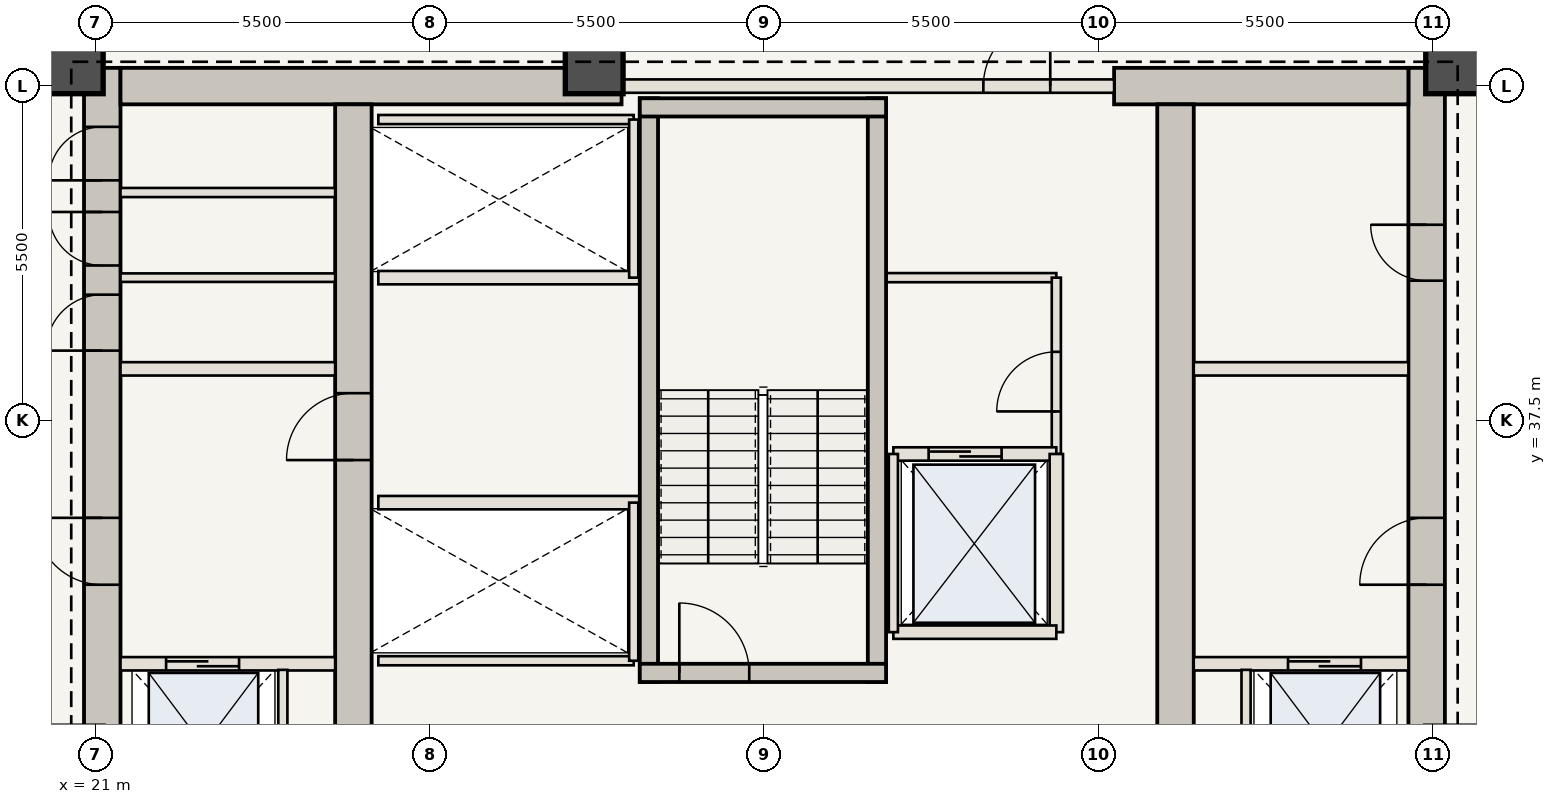
"""IFC4 building model, lengths in metres.
Left out: names, types, materials, properties, quantities, classifications, styles, units other than length and angle.
Written with IfcOpenShell. Run it as: python <this file> out.ifc"""

import sys

from ifc_helpers import new_model, si_unit, direction, frame, frame_2d, origin, origin_2d, place, context, subcontext, project, spatial, rectangle, extrude, element, fill, save


model = new_model("IFC4")
c1 = context("Model", 3, precision=1e-05, world=origin(), true_north=direction((0.0, 1.0)))
c2 = subcontext(c1, "Body", "Model", "MODEL_VIEW")
j1 = project(units=[si_unit("LENGTHUNIT", "METRE"), si_unit("PLANEANGLEUNIT", "RADIAN")], contexts=[c1])
p1 = place(None, origin())
s1 = spatial("IfcSite", under=j1, at=p1, CompositionType="ELEMENT")
p2 = place(p1, origin())
s2 = spatial("IfcBuilding", under=s1, at=p2, CompositionType="ELEMENT")
p3 = place(p2, frame((0.0, 0.0, 141.4)))
s3 = spatial("IfcBuildingStorey", under=s2, at=p3, CompositionType="ELEMENT", Elevation=141.4)
p4 = place(p3, frame((21.11, 30.6, 0.0), z_axis=(0.0, 0.0, 1.0), x_axis=(0.0, 1.0, 0.0)))
e1 = element("IfcWall", 1, at=p4, inside=s3, PredefinedType="SHEAR", context=c2, shape_type="SweptSolid", body=[
    extrude(rectangle(XDim=12.7, YDim=0.6, at=frame_2d((6.35, 0.0))), origin(), (0.0, 0.0, 1.0), 3.85),
])
p5 = place(p4, frame((4.2, 0.0, 0.0)))
e2 = element("IfcOpeningElement", 2, at=p5, cuts=e1, PredefinedType="OPENING", context=c2, shape_type="SweptSolid", body=[
    extrude(rectangle(XDim=1.1, YDim=2.15, at=frame_2d((0.55, 1.075))), frame((0.0, 0.31, 0.0), z_axis=(0.0, -1.0, 0.0), x_axis=(1.0, 0.0, 0.0)), (0.0, 0.0, 1.0), 0.62),
])
p6 = place(p4, frame((8.05, 0.0, 0.0)))
e3 = element("IfcOpeningElement", 3, at=p6, cuts=e1, PredefinedType="OPENING", context=c2, shape_type="SweptSolid", body=[
    extrude(rectangle(XDim=0.92, YDim=2.1, at=frame_2d((0.46, 1.05))), frame((0.0, 0.31, 0.0), z_axis=(0.0, -1.0, 0.0), x_axis=(1.0, 0.0, 0.0)), (0.0, 0.0, 1.0), 0.62),
])
p7 = place(p4, frame((9.45, 0.0, 0.0)))
e4 = element("IfcOpeningElement", 4, at=p7, cuts=e1, PredefinedType="OPENING", context=c2, shape_type="SweptSolid", body=[
    extrude(rectangle(XDim=0.88, YDim=2.1, at=frame_2d((0.44, 1.05))), frame((0.0, 0.31, 0.0), z_axis=(0.0, -1.0, 0.0), x_axis=(1.0, 0.0, 0.0)), (0.0, 0.0, 1.0), 0.62),
])
p8 = place(p4, frame((10.85, 0.0, 0.0)))
e5 = element("IfcOpeningElement", 5, at=p8, cuts=e1, PredefinedType="OPENING", context=c2, shape_type="SweptSolid", body=[
    extrude(rectangle(XDim=0.88, YDim=2.1, at=frame_2d((0.44, 1.05))), frame((0.0, 0.31, 0.0), z_axis=(0.0, -1.0, 0.0), x_axis=(1.0, 0.0, 0.0)), (0.0, 0.0, 1.0), 0.62),
])
p9 = place(p3, frame((42.89, 30.6, 0.0), z_axis=(0.0, 0.0, 1.0), x_axis=(0.0, 1.0, 0.0)))
e6 = element("IfcWall", 6, at=p9, inside=s3, PredefinedType="SHEAR", context=c2, shape_type="SweptSolid", body=[
    extrude(rectangle(XDim=12.7, YDim=0.6, at=frame_2d((6.35, 0.0))), origin(), (0.0, 0.0, 1.0), 3.85),
])
p10 = place(p9, frame((4.2, 0.0, 0.0)))
e7 = element("IfcOpeningElement", 7, at=p10, cuts=e6, PredefinedType="OPENING", context=c2, shape_type="SweptSolid", body=[
    extrude(rectangle(XDim=1.1, YDim=2.15, at=frame_2d((0.55, 1.075))), frame((0.0, 0.31, 0.0), z_axis=(0.0, -1.0, 0.0), x_axis=(1.0, 0.0, 0.0)), (0.0, 0.0, 1.0), 0.62),
])
p11 = place(p9, frame((9.2, 0.0, 0.0)))
e8 = element("IfcOpeningElement", 8, at=p11, cuts=e6, PredefinedType="OPENING", context=c2, shape_type="SweptSolid", body=[
    extrude(rectangle(XDim=0.92, YDim=2.1, at=frame_2d((0.46, 1.05))), frame((0.0, 0.31, 0.0), z_axis=(0.0, -1.0, 0.0), x_axis=(1.0, 0.0, 0.0)), (0.0, 0.0, 1.0), 0.62),
])
p12 = place(p3, frame((21.41, 43.0, 0.0), z_axis=(0.0, 0.0, 1.0), x_axis=(1.0, 0.0, 0.0)))
e9 = element("IfcWall", 9, at=p12, inside=s3, PredefinedType="SHEAR", context=c2, shape_type="SweptSolid", body=[
    extrude(rectangle(XDim=8.24, YDim=0.6, at=frame_2d((4.12, 0.0))), origin(), (0.0, 0.0, 1.0), 3.85),
])
p13 = place(p3, frame((37.75, 43.0, 0.0), z_axis=(0.0, 0.0, 1.0), x_axis=(1.0, 0.0, 0.0)))
e10 = element("IfcWall", 10, at=p13, inside=s3, PredefinedType="SHEAR", context=c2, shape_type="SweptSolid", body=[
    extrude(rectangle(XDim=4.84, YDim=0.6, at=frame_2d((2.42, 0.0))), origin(), (0.0, 0.0, 1.0), 3.85),
])
p14 = place(p3, frame((25.24, 30.6, 0.0), z_axis=(0.0, 0.0, 1.0), x_axis=(0.0, 1.0, 0.0)))
e11 = element("IfcWall", 11, at=p14, inside=s3, PredefinedType="SHEAR", context=c2, shape_type="SweptSolid", body=[
    extrude(rectangle(XDim=12.1, YDim=0.6, at=frame_2d((6.05, 0.0))), origin(), (0.0, 0.0, 1.0), 3.85),
])
p15 = place(p14, frame((6.25, 0.0, 0.0)))
e12 = element("IfcOpeningElement", 12, at=p15, cuts=e11, PredefinedType="OPENING", context=c2, shape_type="SweptSolid", body=[
    extrude(rectangle(XDim=1.1, YDim=2.15, at=frame_2d((0.55, 1.075))), frame((0.0, 0.31, 0.0), z_axis=(0.0, -1.0, 0.0), x_axis=(1.0, 0.0, 0.0)), (0.0, 0.0, 1.0), 0.62),
])
p16 = place(p3, frame((38.76, 30.6, 0.0), z_axis=(0.0, 0.0, 1.0), x_axis=(0.0, 1.0, 0.0)))
e13 = element("IfcWall", 13, at=p16, inside=s3, PredefinedType="SHEAR", context=c2, shape_type="SweptSolid", body=[
    extrude(rectangle(XDim=12.1, YDim=0.6, at=frame_2d((6.05, 0.0))), origin(), (0.0, 0.0, 1.0), 3.85),
])
for number, where, z_axis, x_axis in (
    (14, (43.35, 43.35, 0.0), (0.0, 0.0, 1.0), (1.0, 0.0, 0.0)),
    (15, (29.2, 43.35, 0.0), (0.0, 0.0, 1.0), (1.0, 0.0, 0.0)),
    (16, (20.65, 43.35, 0.0), (0.0, 0.0, 1.0), (1.0, 0.0, 0.0)),
):
    element("IfcColumn", number, at=place(p3, frame(where, z_axis=z_axis, x_axis=x_axis)), inside=s3, PredefinedType="COLUMN", context=c2, shape_type="SweptSolid", body=[
        extrude(rectangle(XDim=0.95, YDim=0.95, at=origin_2d()), origin(), (0.0, 0.0, 1.0), 3.85),
    ])
p17 = place(p3, frame((21.41, 33.5, 0.0), z_axis=(0.0, 0.0, 1.0), x_axis=(1.0, 0.0, 0.0)))
e17 = element("IfcWall", 17, at=p17, inside=s3, PredefinedType="STANDARD", context=c2, shape_type="SweptSolid", body=[
    extrude(rectangle(XDim=3.53, YDim=0.22, at=frame_2d((1.765, 0.0))), origin(), (0.0, 0.0, 1.0), 3.685),
])
p18 = place(p17, frame((0.75, 0.0, 0.0)))
e18 = element("IfcOpeningElement", 18, at=p18, cuts=e17, PredefinedType="OPENING", context=c2, shape_type="SweptSolid", body=[
    extrude(rectangle(XDim=1.2, YDim=2.2, at=frame_2d((0.6, 1.1))), frame((0.0, 0.12, 0.0), z_axis=(0.0, -1.0, 0.0), x_axis=(1.0, 0.0, 0.0)), (0.0, 0.0, 1.0), 0.24),
])
p19 = place(p3, frame((24.08, 30.75, 0.0), z_axis=(0.0, 0.0, 1.0), x_axis=(0.0, 1.0, 0.0)))
e19 = element("IfcWall", 19, at=p19, inside=s3, PredefinedType="STANDARD", context=c2, shape_type="SweptSolid", body=[
    extrude(rectangle(XDim=2.65, YDim=0.15, at=frame_2d((1.325, 0.0))), origin(), (0.0, 0.0, 1.0), 3.685),
])
p20 = place(p3, frame((39.06, 33.5, 0.0), z_axis=(0.0, 0.0, 1.0), x_axis=(1.0, 0.0, 0.0)))
e20 = element("IfcWall", 20, at=p20, inside=s3, PredefinedType="STANDARD", context=c2, shape_type="SweptSolid", body=[
    extrude(rectangle(XDim=3.53, YDim=0.22, at=frame_2d((1.765, 0.0))), origin(), (0.0, 0.0, 1.0), 3.685),
])
p21 = place(p20, frame((1.55, 0.0, 0.0)))
e21 = element("IfcOpeningElement", 21, at=p21, cuts=e20, PredefinedType="OPENING", context=c2, shape_type="SweptSolid", body=[
    extrude(rectangle(XDim=1.2, YDim=2.2, at=frame_2d((0.6, 1.1))), frame((0.0, 0.12, 0.0), z_axis=(0.0, -1.0, 0.0), x_axis=(1.0, 0.0, 0.0)), (0.0, 0.0, 1.0), 0.24),
])
p22 = place(p3, frame((39.92, 30.75, 0.0), z_axis=(0.0, 0.0, 1.0), x_axis=(0.0, 1.0, 0.0)))
e22 = element("IfcWall", 22, at=p22, inside=s3, PredefinedType="STANDARD", context=c2, shape_type="SweptSolid", body=[
    extrude(rectangle(XDim=2.65, YDim=0.15, at=frame_2d((1.325, 0.0))), origin(), (0.0, 0.0, 1.0), 3.685),
])
for number, where, z_axis, x_axis in (
    (23, (21.41, 38.35, 0.0), (0.0, 0.0, 1.0), (1.0, 0.0, 0.0)),
    (24, (39.06, 38.35, 0.0), (0.0, 0.0, 1.0), (1.0, 0.0, 0.0)),
):
    element("IfcWall", number, at=place(p3, frame(where, z_axis=z_axis, x_axis=x_axis)), inside=s3, PredefinedType="STANDARD", context=c2, shape_type="SweptSolid", body=[
        extrude(rectangle(XDim=3.53, YDim=0.22, at=frame_2d((1.765, 0.0))), origin(), (0.0, 0.0, 1.0), 3.685),
    ])
p23 = place(p3, frame((21.41, 39.85, 0.0), z_axis=(0.0, 0.0, 1.0), x_axis=(1.0, 0.0, 0.0)))
e25 = element("IfcWall", 25, at=p23, inside=s3, PredefinedType="STANDARD", context=c2, shape_type="SweptSolid", body=[
    extrude(rectangle(XDim=3.53, YDim=0.14, at=frame_2d((1.765, 0.0))), origin(), (0.0, 0.0, 1.0), 3.685),
])
p24 = place(p3, frame((21.41, 41.25, 0.0), z_axis=(0.0, 0.0, 1.0), x_axis=(1.0, 0.0, 0.0)))
e26 = element("IfcWall", 26, at=p24, inside=s3, PredefinedType="STANDARD", context=c2, shape_type="SweptSolid", body=[
    extrude(rectangle(XDim=3.53, YDim=0.15, at=frame_2d((1.765, 0.0))), origin(), (0.0, 0.0, 1.0), 3.685),
])
p25 = place(p3, frame((34.0, 39.85, 0.0), z_axis=(0.0, 0.0, 1.0), x_axis=(1.0, 0.0, 0.0)))
e27 = element("IfcWall", 27, at=p25, inside=s3, PredefinedType="STANDARD", context=c2, shape_type="SweptSolid", body=[
    extrude(rectangle(XDim=2.8, YDim=0.15, at=frame_2d((1.4, 0.0))), origin(), (0.0, 0.0, 1.0), 3.685),
])
p26 = place(p3, frame((36.8, 36.95, 0.0), z_axis=(0.0, 0.0, 1.0), x_axis=(0.0, 1.0, 0.0)))
e28 = element("IfcWall", 28, at=p26, inside=s3, PredefinedType="STANDARD", context=c2, shape_type="SweptSolid", body=[
    extrude(rectangle(XDim=2.9, YDim=0.15, at=frame_2d((1.45, 0.0))), origin(), (0.0, 0.0, 1.0), 3.685),
])
p27 = place(p26, frame((0.7, 0.0, 0.0)))
e29 = element("IfcOpeningElement", 29, at=p27, cuts=e28, PredefinedType="OPENING", context=c2, shape_type="SweptSolid", body=[
    extrude(rectangle(XDim=0.98, YDim=2.2, at=frame_2d((0.49, 1.1))), frame((0.0, 0.085, 0.0), z_axis=(0.0, -1.0, 0.0), x_axis=(1.0, 0.0, 0.0)), (0.0, 0.0, 1.0), 0.17),
])
p28 = place(p3, frame((25.65, 36.15, 0.0), z_axis=(0.0, 0.0, 1.0), x_axis=(1.0, 0.0, 0.0)))
e30 = element("IfcWall", 30, at=p28, inside=s3, PredefinedType="STANDARD", context=c2, shape_type="SweptSolid", body=[
    extrude(rectangle(XDim=4.3, YDim=0.22, at=frame_2d((2.15, 0.0))), origin(), (0.0, 0.0, 1.0), 3.685),
])
p29 = place(p3, frame((25.65, 33.55, 0.0), z_axis=(0.0, 0.0, 1.0), x_axis=(1.0, 0.0, 0.0)))
e31 = element("IfcWall", 31, at=p29, inside=s3, PredefinedType="STANDARD", context=c2, shape_type="SweptSolid", body=[
    extrude(rectangle(XDim=4.2, YDim=0.15, at=frame_2d((2.1, 0.0))), origin(), (0.0, 0.0, 1.0), 3.685),
])
p30 = place(p3, frame((29.85, 33.55, 0.0), z_axis=(0.0, 0.0, 1.0), x_axis=(0.0, 1.0, 0.0)))
e32 = element("IfcWall", 32, at=p30, inside=s3, PredefinedType="STANDARD", context=c2, shape_type="SweptSolid", body=[
    extrude(rectangle(XDim=2.6, YDim=0.15, at=frame_2d((1.3, 0.0))), origin(), (0.0, 0.0, 1.0), 3.685),
])
p31 = place(p3, frame((25.65, 39.85, 0.0), z_axis=(0.0, 0.0, 1.0), x_axis=(1.0, 0.0, 0.0)))
e33 = element("IfcWall", 33, at=p31, inside=s3, PredefinedType="STANDARD", context=c2, shape_type="SweptSolid", body=[
    extrude(rectangle(XDim=4.3, YDim=0.22, at=frame_2d((2.15, 0.0))), origin(), (0.0, 0.0, 1.0), 3.685),
])
p32 = place(p3, frame((25.65, 42.45, 0.0), z_axis=(0.0, 0.0, 1.0), x_axis=(1.0, 0.0, 0.0)))
e34 = element("IfcWall", 34, at=p32, inside=s3, PredefinedType="STANDARD", context=c2, shape_type="SweptSolid", body=[
    extrude(rectangle(XDim=4.2, YDim=0.15, at=frame_2d((2.1, 0.0))), origin(), (0.0, 0.0, 1.0), 3.685),
])
p33 = place(p3, frame((29.85, 39.85, 0.0), z_axis=(0.0, 0.0, 1.0), x_axis=(0.0, 1.0, 0.0)))
e35 = element("IfcWall", 35, at=p33, inside=s3, PredefinedType="STANDARD", context=c2, shape_type="SweptSolid", body=[
    extrude(rectangle(XDim=2.6, YDim=0.15, at=frame_2d((1.3, 0.0))), origin(), (0.0, 0.0, 1.0), 3.685),
])
for number, where, z_axis, x_axis in (
    (36, (30.1, 33.2, 0.0), (0.0, 0.0, 1.0), (0.0, 1.0, 0.0)),
    (37, (33.85, 33.2, 0.0), (0.0, 0.0, 1.0), (0.0, 1.0, 0.0)),
):
    element("IfcWall", number, at=place(p3, frame(where, z_axis=z_axis, x_axis=x_axis)), inside=s3, PredefinedType="SHEAR", context=c2, shape_type="SweptSolid", body=[
        extrude(rectangle(XDim=9.6, YDim=0.3, at=frame_2d((4.8, 0.0))), origin(), (0.0, 0.0, 1.0), 3.685),
    ])
p34 = place(p3, frame((29.95, 33.35, 0.0), z_axis=(0.0, 0.0, 1.0), x_axis=(1.0, 0.0, 0.0)))
e38 = element("IfcWall", 38, at=p34, inside=s3, PredefinedType="SHEAR", context=c2, shape_type="SweptSolid", body=[
    extrude(rectangle(XDim=4.05, YDim=0.3, at=frame_2d((2.025, 0.0))), origin(), (0.0, 0.0, 1.0), 3.685),
])
p35 = place(p34, frame((0.65, 0.0, 0.0)))
e39 = element("IfcOpeningElement", 39, at=p35, cuts=e38, PredefinedType="OPENING", context=c2, shape_type="SweptSolid", body=[
    extrude(rectangle(XDim=1.15, YDim=2.15, at=frame_2d((0.575, 1.075))), frame((0.0, 0.16, 0.0), z_axis=(0.0, -1.0, 0.0), x_axis=(1.0, 0.0, 0.0)), (0.0, 0.0, 1.0), 0.32),
])
p36 = place(p3, frame((29.95, 42.65, 0.0), z_axis=(0.0, 0.0, 1.0), x_axis=(1.0, 0.0, 0.0)))
e40 = element("IfcWall", 40, at=p36, inside=s3, PredefinedType="SHEAR", context=c2, shape_type="SweptSolid", body=[
    extrude(rectangle(XDim=4.05, YDim=0.3, at=frame_2d((2.025, 0.0))), origin(), (0.0, 0.0, 1.0), 3.685),
])
p37 = place(p3, frame((29.65, 43.0, 0.0), z_axis=(0.0, 0.0, 1.0), x_axis=(1.0, 0.0, 0.0)))
e41 = element("IfcWall", 41, at=p37, inside=s3, PredefinedType="STANDARD", context=c2, shape_type="SweptSolid", body=[
    extrude(rectangle(XDim=8.1, YDim=0.22, at=frame_2d((4.05, 0.0))), origin(), (0.0, 0.0, 1.0), 3.685),
])
p38 = place(p37, frame((5.95, 0.0, 0.0)))
e42 = element("IfcOpeningElement", 42, at=p38, cuts=e41, PredefinedType="OPENING", context=c2, shape_type="SweptSolid", body=[
    extrude(rectangle(XDim=1.1, YDim=2.15, at=frame_2d((0.55, 1.075))), frame((0.0, 0.12, 0.0), z_axis=(0.0, -1.0, 0.0), x_axis=(1.0, 0.0, 0.0)), (0.0, 0.0, 1.0), 0.24),
])
p39 = place(p3, frame((34.12, 36.95, 0.0), z_axis=(0.0, 0.0, 1.0), x_axis=(1.0, 0.0, 0.0)))
e43 = element("IfcWall", 43, at=p39, inside=s3, PredefinedType="STANDARD", context=c2, shape_type="SweptSolid", body=[
    extrude(rectangle(XDim=2.68, YDim=0.22, at=frame_2d((1.34, 0.0))), origin(), (0.0, 0.0, 1.0), 3.685),
])
p40 = place(p39, frame((0.58, 0.0, 0.0)))
e44 = element("IfcOpeningElement", 44, at=p40, cuts=e43, PredefinedType="OPENING", context=c2, shape_type="SweptSolid", body=[
    extrude(rectangle(XDim=1.2, YDim=2.2, at=frame_2d((0.6, 1.1))), frame((0.0, 0.12, 0.0), z_axis=(0.0, -1.0, 0.0), x_axis=(1.0, 0.0, 0.0)), (0.0, 0.0, 1.0), 0.24),
])
p41 = place(p3, frame((36.8, 34.02, 0.0), z_axis=(0.0, 0.0, 1.0), x_axis=(0.0, 1.0, 0.0)))
e45 = element("IfcWall", 45, at=p41, inside=s3, PredefinedType="STANDARD", context=c2, shape_type="SweptSolid", body=[
    extrude(rectangle(XDim=2.93, YDim=0.22, at=frame_2d((1.465, 0.0))), origin(), (0.0, 0.0, 1.0), 3.685),
])
p42 = place(p3, frame((34.12, 34.02, 0.0), z_axis=(0.0, 0.0, 1.0), x_axis=(1.0, 0.0, 0.0)))
e46 = element("IfcWall", 46, at=p42, inside=s3, PredefinedType="STANDARD", context=c2, shape_type="SweptSolid", body=[
    extrude(rectangle(XDim=2.68, YDim=0.22, at=frame_2d((1.34, 0.0))), origin(), (0.0, 0.0, 1.0), 3.685),
])
p43 = place(p3, frame((34.12, 34.02, 0.0), z_axis=(0.0, 0.0, 1.0), x_axis=(0.0, 1.0, 0.0)))
e47 = element("IfcWall", 47, at=p43, inside=s3, PredefinedType="STANDARD", context=c2, shape_type="SweptSolid", body=[
    extrude(rectangle(XDim=2.93, YDim=0.15, at=frame_2d((1.465, 0.0))), origin(), (0.0, 0.0, 1.0), 3.685),
])
p44 = place(p5, origin())
e48 = element("IfcDoor", 48, at=p44, inside=s3, OperationType="SINGLE_SWING_RIGHT", PredefinedType="DOOR", context=c2, shape_type="SweptSolid", body=[
    extrude(rectangle(XDim=1.1, YDim=2.15, at=frame_2d((0.55, 1.075))), frame((0.0, 0.025, 0.0), z_axis=(0.0, -1.0, 0.0), x_axis=(1.0, 0.0, 0.0)), (0.0, 0.0, 1.0), 0.05),
])
fill(e2, e48)
p45 = place(p10, origin())
e49 = element("IfcDoor", 49, at=p45, inside=s3, OperationType="SINGLE_SWING_LEFT", PredefinedType="DOOR", context=c2, shape_type="SweptSolid", body=[
    extrude(rectangle(XDim=1.1, YDim=2.15, at=frame_2d((0.55, 1.075))), frame((0.0, 0.025, 0.0), z_axis=(0.0, -1.0, 0.0), x_axis=(1.0, 0.0, 0.0)), (0.0, 0.0, 1.0), 0.05),
])
fill(e7, e49)
p46 = place(p15, origin())
e50 = element("IfcDoor", 50, at=p46, inside=s3, OperationType="SINGLE_SWING_LEFT", PredefinedType="DOOR", context=c2, shape_type="SweptSolid", body=[
    extrude(rectangle(XDim=1.1, YDim=2.15, at=frame_2d((0.55, 1.075))), frame((0.0, 0.025, 0.0), z_axis=(0.0, -1.0, 0.0), x_axis=(1.0, 0.0, 0.0)), (0.0, 0.0, 1.0), 0.05),
])
fill(e12, e50)
p47 = place(p6, origin())
e51 = element("IfcDoor", 51, at=p47, inside=s3, OperationType="SINGLE_SWING_LEFT", PredefinedType="DOOR", context=c2, shape_type="SweptSolid", body=[
    extrude(rectangle(XDim=0.92, YDim=2.1, at=frame_2d((0.46, 1.05))), frame((0.0, 0.025, 0.0), z_axis=(0.0, -1.0, 0.0), x_axis=(1.0, 0.0, 0.0)), (0.0, 0.0, 1.0), 0.05),
])
fill(e3, e51)
p48 = place(p7, origin())
e52 = element("IfcDoor", 52, at=p48, inside=s3, OperationType="SINGLE_SWING_RIGHT", PredefinedType="DOOR", context=c2, shape_type="SweptSolid", body=[
    extrude(rectangle(XDim=0.88, YDim=2.1, at=frame_2d((0.44, 1.05))), frame((0.0, 0.025, 0.0), z_axis=(0.0, -1.0, 0.0), x_axis=(1.0, 0.0, 0.0)), (0.0, 0.0, 1.0), 0.05),
])
fill(e4, e52)
p49 = place(p8, origin())
e53 = element("IfcDoor", 53, at=p49, inside=s3, OperationType="SINGLE_SWING_LEFT", PredefinedType="DOOR", context=c2, shape_type="SweptSolid", body=[
    extrude(rectangle(XDim=0.88, YDim=2.1, at=frame_2d((0.44, 1.05))), frame((0.0, 0.025, 0.0), z_axis=(0.0, -1.0, 0.0), x_axis=(1.0, 0.0, 0.0)), (0.0, 0.0, 1.0), 0.05),
])
fill(e5, e53)
p50 = place(p11, origin())
e54 = element("IfcDoor", 54, at=p50, inside=s3, OperationType="SINGLE_SWING_RIGHT", PredefinedType="DOOR", context=c2, shape_type="SweptSolid", body=[
    extrude(rectangle(XDim=0.92, YDim=2.1, at=frame_2d((0.46, 1.05))), frame((0.0, 0.025, 0.0), z_axis=(0.0, -1.0, 0.0), x_axis=(1.0, 0.0, 0.0)), (0.0, 0.0, 1.0), 0.05),
])
fill(e8, e54)
p51 = place(p18, origin())
e55 = element("IfcDoor", 55, at=p51, inside=s3, OperationType="DOUBLE_DOOR_SLIDING", PredefinedType="DOOR", context=c2, shape_type="SweptSolid", body=[
    extrude(rectangle(XDim=1.2, YDim=2.2, at=frame_2d((0.6, 1.1))), frame((0.0, 0.025, 0.0), z_axis=(0.0, -1.0, 0.0), x_axis=(1.0, 0.0, 0.0)), (0.0, 0.0, 1.0), 0.05),
])
fill(e18, e55)
p52 = place(p21, origin())
e56 = element("IfcDoor", 56, at=p52, inside=s3, OperationType="DOUBLE_DOOR_SLIDING", PredefinedType="DOOR", context=c2, shape_type="SweptSolid", body=[
    extrude(rectangle(XDim=1.2, YDim=2.2, at=frame_2d((0.6, 1.1))), frame((0.0, 0.025, 0.0), z_axis=(0.0, -1.0, 0.0), x_axis=(1.0, 0.0, 0.0)), (0.0, 0.0, 1.0), 0.05),
])
fill(e21, e56)
p53 = place(p27, origin())
e57 = element("IfcDoor", 57, at=p53, inside=s3, OperationType="SINGLE_SWING_LEFT", PredefinedType="DOOR", context=c2, shape_type="SweptSolid", body=[
    extrude(rectangle(XDim=0.98, YDim=2.2, at=frame_2d((0.49, 1.1))), frame((0.0, 0.025, 0.0), z_axis=(0.0, -1.0, 0.0), x_axis=(1.0, 0.0, 0.0)), (0.0, 0.0, 1.0), 0.05),
])
fill(e29, e57)
p54 = place(p35, origin())
e58 = element("IfcDoor", 58, at=p54, inside=s3, OperationType="SINGLE_SWING_LEFT", PredefinedType="DOOR", context=c2, shape_type="SweptSolid", body=[
    extrude(rectangle(XDim=1.15, YDim=2.15, at=frame_2d((0.575, 1.075))), frame((0.0, 0.025, 0.0), z_axis=(0.0, -1.0, 0.0), x_axis=(1.0, 0.0, 0.0)), (0.0, 0.0, 1.0), 0.05),
])
fill(e39, e58)
p55 = place(p38, origin())
e59 = element("IfcDoor", 59, at=p55, inside=s3, OperationType="SINGLE_SWING_RIGHT", PredefinedType="DOOR", context=c2, shape_type="SweptSolid", body=[
    extrude(rectangle(XDim=1.1, YDim=2.15, at=frame_2d((0.55, 1.075))), frame((0.0, 0.025, 0.0), z_axis=(0.0, -1.0, 0.0), x_axis=(1.0, 0.0, 0.0)), (0.0, 0.0, 1.0), 0.05),
])
fill(e42, e59)
p56 = place(p40, origin())
e60 = element("IfcDoor", 60, at=p56, inside=s3, OperationType="DOUBLE_DOOR_SLIDING", PredefinedType="DOOR", context=c2, shape_type="SweptSolid", body=[
    extrude(rectangle(XDim=1.2, YDim=2.2, at=frame_2d((0.6, 1.1))), frame((0.0, 0.025, 0.0), z_axis=(0.0, -1.0, 0.0), x_axis=(1.0, 0.0, 0.0)), (0.0, 0.0, 1.0), 0.05),
])
fill(e44, e60)
save(model, sys.argv[1])
